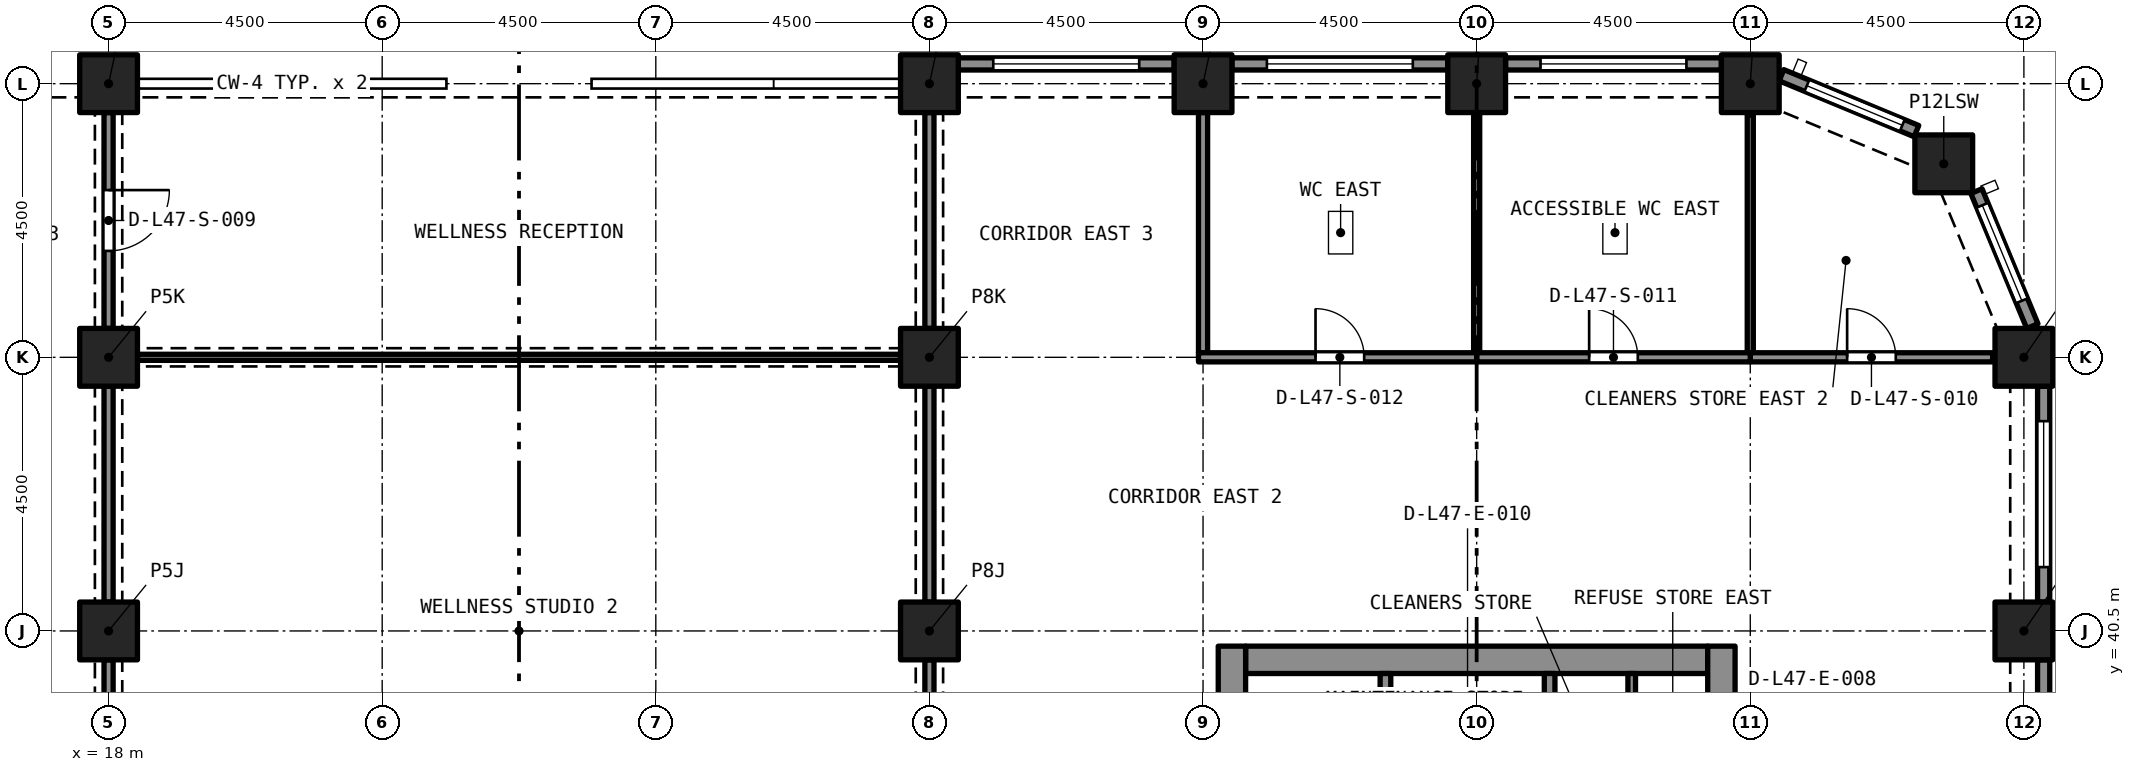
"""IFC4 building model, lengths in metres.
Left out: names, types, materials, properties, quantities, classifications, styles, units other than length and angle.
Written with IfcOpenShell. Run it as: python <this file> out.ifc"""

import sys

from ifc_helpers import new_model, si_unit, direction, frame, frame_2d, origin, origin_2d, place, context, subcontext, project, spatial, rectangle, extrude, element, fill, save


model = new_model("IFC4")
c1 = context("Model", 3, precision=1e-05, world=origin(), true_north=direction((0.0, 1.0)))
c2 = subcontext(c1, "Body", "Model", "MODEL_VIEW")
j1 = project(units=[si_unit("LENGTHUNIT", "METRE"), si_unit("PLANEANGLEUNIT", "RADIAN")], contexts=[c1])
p1 = place(None, origin())
s1 = spatial("IfcSite", under=j1, at=p1, CompositionType="ELEMENT")
p2 = place(p1, origin())
s2 = spatial("IfcBuilding", under=s1, at=p2, CompositionType="ELEMENT")
p3 = place(p2, frame((0.0, 0.0, 172.6)))
s3 = spatial("IfcBuildingStorey", under=s2, at=p3, CompositionType="ELEMENT", Elevation=172.6)
for number, where, z_axis, x_axis in (
    (1, (18.0, 40.5, 0.0), (0.0, 0.0, 1.0), (1.0, 0.0, 0.0)),
    (2, (31.5, 40.5, 0.0), (0.0, 0.0, 1.0), (1.0, 0.0, 0.0)),
    (3, (49.5, 40.5, 0.0), (0.0, 0.0, 1.0), (1.0, 0.0, 0.0)),
    (4, (18.0, 45.0, 0.0), (0.0, 0.0, 1.0), (1.0, 0.0, 0.0)),
    (5, (31.5, 45.0, 0.0), (0.0, 0.0, 1.0), (1.0, 0.0, 0.0)),
    (6, (49.5, 45.0, 0.0), (0.0, 0.0, 1.0), (1.0, 0.0, 0.0)),
    (7, (48.182, 48.182, 0.0), (0.0, 0.0, 1.0), (1.0, 0.0, 0.0)),
    (8, (18.0, 49.5, 0.0), (0.0, 0.0, 1.0), (1.0, 0.0, 0.0)),
    (9, (31.5, 49.5, 0.0), (0.0, 0.0, 1.0), (1.0, 0.0, 0.0)),
    (10, (36.0, 49.5, 0.0), (0.0, 0.0, 1.0), (1.0, 0.0, 0.0)),
    (11, (40.5, 49.5, 0.0), (0.0, 0.0, 1.0), (1.0, 0.0, 0.0)),
    (12, (45.0, 49.5, 0.0), (0.0, 0.0, 1.0), (1.0, 0.0, 0.0)),
):
    element("IfcColumn", number, at=place(p3, frame(where, z_axis=z_axis, x_axis=x_axis)), inside=s3, PredefinedType="COLUMN", context=c2, shape_type="SweptSolid", body=[
        extrude(rectangle(XDim=0.95, YDim=0.95, at=origin_2d()), origin(), (0.0, 0.0, 1.0), 3.7),
    ])
p4 = place(p3, frame((36.7, 40.025, 0.0), z_axis=(0.0, 0.0, 1.0), x_axis=(1.0, 0.0, 0.0)))
e13 = element("IfcWall", 13, at=p4, inside=s3, PredefinedType="SOLIDWALL", context=c2, shape_type="SweptSolid", body=[
    extrude(rectangle(XDim=7.6, YDim=0.45, at=frame_2d((3.8, 0.0))), origin(), (0.0, 0.0, 1.0), 3.7),
])
p5 = place(p3, frame((36.475, 27.25, 0.0), z_axis=(0.0, 0.0, 1.0), x_axis=(0.0, 1.0, 0.0)))
e14 = element("IfcWall", 14, at=p5, inside=s3, PredefinedType="SOLIDWALL", context=c2, shape_type="SweptSolid", body=[
    extrude(rectangle(XDim=13.0, YDim=0.45, at=frame_2d((6.5, 0.0))), origin(), (0.0, 0.0, 1.0), 3.7),
])
p6 = place(p5, frame((8.7, 0.0, 0.0)))
e15 = element("IfcOpeningElement", 15, at=p6, cuts=e14, PredefinedType="OPENING", context=c2, shape_type="SweptSolid", body=[
    extrude(rectangle(XDim=1.2, YDim=2.1, at=frame_2d((0.6, 1.05))), frame((0.0, 0.235, 0.0), z_axis=(0.0, -1.0, 0.0), x_axis=(1.0, 0.0, 0.0)), (0.0, 0.0, 1.0), 0.47),
])
p7 = place(p3, frame((44.525, 27.25, 0.0), z_axis=(0.0, 0.0, 1.0), x_axis=(0.0, 1.0, 0.0)))
e16 = element("IfcWall", 16, at=p7, inside=s3, PredefinedType="SOLIDWALL", context=c2, shape_type="SweptSolid", body=[
    extrude(rectangle(XDim=13.0, YDim=0.45, at=frame_2d((6.5, 0.0))), origin(), (0.0, 0.0, 1.0), 3.7),
])
p8 = place(p7, frame((8.7, 0.0, 0.0)))
e17 = element("IfcOpeningElement", 17, at=p8, cuts=e16, PredefinedType="OPENING", context=c2, shape_type="SweptSolid", body=[
    extrude(rectangle(XDim=1.2, YDim=2.1, at=frame_2d((0.6, 1.05))), frame((0.0, 0.235, 0.0), z_axis=(0.0, -1.0, 0.0), x_axis=(1.0, 0.0, 0.0)), (0.0, 0.0, 1.0), 0.47),
])
p9 = place(p3, frame((49.825, 40.025, 0.0), z_axis=(0.0, 0.0, 1.0), x_axis=(0.0, -1.0, 0.0)))
e18 = element("IfcWall", 18, at=p9, inside=s3, PredefinedType="SOLIDWALL", context=c2, shape_type="SweptSolid", body=[
    extrude(rectangle(XDim=3.55, YDim=0.2, at=frame_2d((1.775, 0.0))), origin(), (0.0, 0.0, 1.0), 3.7),
])
p10 = place(p9, frame((0.575, 0.0, 0.45)))
e19 = element("IfcOpeningElement", 19, at=p10, cuts=e18, PredefinedType="OPENING", context=c2, shape_type="SweptSolid", body=[
    extrude(rectangle(XDim=2.4, YDim=1.95, at=frame_2d((1.2, 0.975))), frame((0.0, 0.11, 0.0), z_axis=(0.0, -1.0, 0.0), x_axis=(1.0, 0.0, 0.0)), (0.0, 0.0, 1.0), 0.22),
])
p11 = place(p3, frame((49.825, 44.525, 0.0), z_axis=(0.0, 0.0, 1.0), x_axis=(0.0, -1.0, 0.0)))
e20 = element("IfcWall", 20, at=p11, inside=s3, PredefinedType="SOLIDWALL", context=c2, shape_type="SweptSolid", body=[
    extrude(rectangle(XDim=3.55, YDim=0.2, at=frame_2d((1.775, 0.0))), origin(), (0.0, 0.0, 1.0), 3.7),
])
p12 = place(p11, frame((0.575, 0.0, 0.45)))
e21 = element("IfcOpeningElement", 21, at=p12, cuts=e20, PredefinedType="OPENING", context=c2, shape_type="SweptSolid", body=[
    extrude(rectangle(XDim=2.4, YDim=1.95, at=frame_2d((1.2, 0.975))), frame((0.0, 0.11, 0.0), z_axis=(0.0, -1.0, 0.0), x_axis=(1.0, 0.0, 0.0)), (0.0, 0.0, 1.0), 0.22),
])
p13 = place(p3, frame((48.72, 47.733, 0.0), z_axis=(0.0, 0.0, 1.0), x_axis=(0.382680855588, -0.923880599843, 0.0)))
e22 = element("IfcWall", 22, at=p13, inside=s3, PredefinedType="SOLIDWALL", context=c2, shape_type="SweptSolid", body=[
    extrude(rectangle(XDim=2.403, YDim=0.2, at=frame_2d((1.201, 0.0))), origin(), (0.0, 0.0, 1.0), 3.7),
])
p14 = place(p13, frame((0.251, 0.0, 0.45)))
e23 = element("IfcOpeningElement", 23, at=p14, cuts=e22, PredefinedType="OPENING", context=c2, shape_type="SweptSolid", body=[
    extrude(rectangle(XDim=1.7, YDim=1.95, at=frame_2d((0.85, 0.975))), frame((0.0, 0.11, 0.0), z_axis=(0.0, -1.0, 0.0), x_axis=(1.0, 0.0, 0.0)), (0.0, 0.0, 1.0), 0.22),
])
p15 = place(p3, frame((45.513, 49.639, 0.0), z_axis=(0.0, 0.0, 1.0), x_axis=(0.923880599843, -0.382680855588, 0.0)))
e24 = element("IfcWall", 24, at=p15, inside=s3, PredefinedType="SOLIDWALL", context=c2, shape_type="SweptSolid", body=[
    extrude(rectangle(XDim=2.403, YDim=0.2, at=frame_2d((1.201, 0.0))), origin(), (0.0, 0.0, 1.0), 3.7),
])
p16 = place(p15, frame((0.451, 0.0, 0.45)))
e25 = element("IfcOpeningElement", 25, at=p16, cuts=e24, PredefinedType="OPENING", context=c2, shape_type="SweptSolid", body=[
    extrude(rectangle(XDim=1.7, YDim=1.95, at=frame_2d((0.85, 0.975))), frame((0.0, 0.11, 0.0), z_axis=(0.0, -1.0, 0.0), x_axis=(1.0, 0.0, 0.0)), (0.0, 0.0, 1.0), 0.22),
])
p17 = place(p3, frame((40.975, 49.825, 0.0), z_axis=(0.0, 0.0, 1.0), x_axis=(1.0, 0.0, 0.0)))
e26 = element("IfcWall", 26, at=p17, inside=s3, PredefinedType="SOLIDWALL", context=c2, shape_type="SweptSolid", body=[
    extrude(rectangle(XDim=3.55, YDim=0.2, at=frame_2d((1.775, 0.0))), origin(), (0.0, 0.0, 1.0), 3.7),
])
p18 = place(p17, frame((0.575, 0.0, 0.45)))
e27 = element("IfcOpeningElement", 27, at=p18, cuts=e26, PredefinedType="OPENING", context=c2, shape_type="SweptSolid", body=[
    extrude(rectangle(XDim=2.4, YDim=1.95, at=frame_2d((1.2, 0.975))), frame((0.0, 0.11, 0.0), z_axis=(0.0, -1.0, 0.0), x_axis=(1.0, 0.0, 0.0)), (0.0, 0.0, 1.0), 0.22),
])
p19 = place(p3, frame((36.475, 49.825, 0.0), z_axis=(0.0, 0.0, 1.0), x_axis=(1.0, 0.0, 0.0)))
e28 = element("IfcWall", 28, at=p19, inside=s3, PredefinedType="SOLIDWALL", context=c2, shape_type="SweptSolid", body=[
    extrude(rectangle(XDim=3.55, YDim=0.2, at=frame_2d((1.775, 0.0))), origin(), (0.0, 0.0, 1.0), 3.7),
])
p20 = place(p19, frame((0.575, 0.0, 0.45)))
e29 = element("IfcOpeningElement", 29, at=p20, cuts=e28, PredefinedType="OPENING", context=c2, shape_type="SweptSolid", body=[
    extrude(rectangle(XDim=2.4, YDim=1.95, at=frame_2d((1.2, 0.975))), frame((0.0, 0.11, 0.0), z_axis=(0.0, -1.0, 0.0), x_axis=(1.0, 0.0, 0.0)), (0.0, 0.0, 1.0), 0.22),
])
p21 = place(p3, frame((31.975, 49.825, 0.0), z_axis=(0.0, 0.0, 1.0), x_axis=(1.0, 0.0, 0.0)))
e30 = element("IfcWall", 30, at=p21, inside=s3, PredefinedType="SOLIDWALL", context=c2, shape_type="SweptSolid", body=[
    extrude(rectangle(XDim=3.55, YDim=0.2, at=frame_2d((1.775, 0.0))), origin(), (0.0, 0.0, 1.0), 3.7),
])
p22 = place(p21, frame((0.575, 0.0, 0.45)))
e31 = element("IfcOpeningElement", 31, at=p22, cuts=e30, PredefinedType="OPENING", context=c2, shape_type="SweptSolid", body=[
    extrude(rectangle(XDim=2.4, YDim=1.95, at=frame_2d((1.2, 0.975))), frame((0.0, 0.11, 0.0), z_axis=(0.0, -1.0, 0.0), x_axis=(1.0, 0.0, 0.0)), (0.0, 0.0, 1.0), 0.22),
])
for number, where, z_axis, x_axis in (
    (32, (41.7, 37.5, 0.0), (0.0, 0.0, 1.0), (0.0, 1.0, 0.0)),
    (33, (39.0, 37.5, 0.0), (0.0, 0.0, 1.0), (0.0, 1.0, 0.0)),
):
    element("IfcWall", number, at=place(p3, frame(where, z_axis=z_axis, x_axis=x_axis)), inside=s3, PredefinedType="SOLIDWALL", context=c2, shape_type="SweptSolid", body=[
        extrude(rectangle(XDim=2.3, YDim=0.175, at=frame_2d((1.15, 0.0))), origin(), (0.0, 0.0, 1.0), 3.4),
    ])
p23 = place(p3, frame((43.05, 37.5, 0.0), z_axis=(0.0, 0.0, 1.0), x_axis=(0.0, 1.0, 0.0)))
e34 = element("IfcWall", 34, at=p23, inside=s3, PredefinedType="PARTITIONING", context=c2, shape_type="SweptSolid", body=[
    extrude(rectangle(XDim=2.3, YDim=0.125, at=frame_2d((1.15, 0.0))), origin(), (0.0, 0.0, 1.0), 3.4),
])
p24 = place(p3, frame((18.475, 45.0, 0.0), z_axis=(0.0, 0.0, 1.0), x_axis=(1.0, 0.0, 0.0)))
e35 = element("IfcWall", 35, at=p24, inside=s3, PredefinedType="PARTITIONING", context=c2, shape_type="SweptSolid", body=[
    extrude(rectangle(XDim=12.55, YDim=0.1, at=frame_2d((6.275, 0.0))), origin(), (0.0, 0.0, 1.0), 3.25),
])
p25 = place(p3, frame((31.5, 36.475, 0.0), z_axis=(0.0, 0.0, 1.0), x_axis=(0.0, 1.0, 0.0)))
e36 = element("IfcWall", 36, at=p25, inside=s3, PredefinedType="PARTITIONING", context=c2, shape_type="SweptSolid", body=[
    extrude(rectangle(XDim=3.55, YDim=0.15, at=frame_2d((1.775, 0.0))), origin(), (0.0, 0.0, 1.0), 2.88),
])
p26 = place(p25, frame((1.275, 0.0, 0.0)))
e37 = element("IfcOpeningElement", 37, at=p26, cuts=e36, PredefinedType="OPENING", context=c2, shape_type="SweptSolid", body=[
    extrude(rectangle(XDim=1.0, YDim=2.1, at=frame_2d((0.5, 1.05))), frame((0.0, 0.085, 0.0), z_axis=(0.0, -1.0, 0.0), x_axis=(1.0, 0.0, 0.0)), (0.0, 0.0, 1.0), 0.17),
])
p27 = place(p3, frame((31.5, 40.975, 0.0), z_axis=(0.0, 0.0, 1.0), x_axis=(0.0, 1.0, 0.0)))
e38 = element("IfcWall", 38, at=p27, inside=s3, PredefinedType="PARTITIONING", context=c2, shape_type="SweptSolid", body=[
    extrude(rectangle(XDim=3.55, YDim=0.15, at=frame_2d((1.775, 0.0))), origin(), (0.0, 0.0, 1.0), 2.88),
])
p28 = place(p3, frame((18.0, 40.025, 0.0), z_axis=(0.0, 0.0, 1.0), x_axis=(0.0, -1.0, 0.0)))
e39 = element("IfcWall", 39, at=p28, inside=s3, PredefinedType="PARTITIONING", context=c2, shape_type="SweptSolid", body=[
    extrude(rectangle(XDim=3.55, YDim=0.15, at=frame_2d((1.775, 0.0))), origin(), (0.0, 0.0, 1.0), 2.88),
])
p29 = place(p28, frame((1.275, 0.0, 0.0)))
e40 = element("IfcOpeningElement", 40, at=p29, cuts=e39, PredefinedType="OPENING", context=c2, shape_type="SweptSolid", body=[
    extrude(rectangle(XDim=1.0, YDim=2.1, at=frame_2d((0.5, 1.05))), frame((0.0, 0.085, 0.0), z_axis=(0.0, -1.0, 0.0), x_axis=(1.0, 0.0, 0.0)), (0.0, 0.0, 1.0), 0.17),
])
for number, where, z_axis, x_axis in (
    (41, (18.0, 40.975, 0.0), (0.0, 0.0, 1.0), (0.0, 1.0, 0.0)),
    (42, (31.5, 45.475, 0.0), (0.0, 0.0, 1.0), (0.0, 1.0, 0.0)),
):
    element("IfcWall", number, at=place(p3, frame(where, z_axis=z_axis, x_axis=x_axis)), inside=s3, PredefinedType="PARTITIONING", context=c2, shape_type="SweptSolid", body=[
        extrude(rectangle(XDim=3.55, YDim=0.15, at=frame_2d((1.775, 0.0))), origin(), (0.0, 0.0, 1.0), 2.88),
    ])
p30 = place(p3, frame((18.0, 49.025, 0.0), z_axis=(0.0, 0.0, 1.0), x_axis=(0.0, -1.0, 0.0)))
e43 = element("IfcWall", 43, at=p30, inside=s3, PredefinedType="PARTITIONING", context=c2, shape_type="SweptSolid", body=[
    extrude(rectangle(XDim=3.55, YDim=0.15, at=frame_2d((1.775, 0.0))), origin(), (0.0, 0.0, 1.0), 2.88),
])
p31 = place(p30, frame((1.275, 0.0, 0.0)))
e44 = element("IfcOpeningElement", 44, at=p31, cuts=e43, PredefinedType="OPENING", context=c2, shape_type="SweptSolid", body=[
    extrude(rectangle(XDim=1.0, YDim=2.1, at=frame_2d((0.5, 1.05))), frame((0.0, 0.085, 0.0), z_axis=(0.0, -1.0, 0.0), x_axis=(1.0, 0.0, 0.0)), (0.0, 0.0, 1.0), 0.17),
])
p32 = place(p3, frame((45.0, 45.075, 0.0), z_axis=(0.0, 0.0, 1.0), x_axis=(0.0, 1.0, 0.0)))
e45 = element("IfcWall", 45, at=p32, inside=s3, PredefinedType="PARTITIONING", context=c2, shape_type="SweptSolid", body=[
    extrude(rectangle(XDim=3.911, YDim=0.1, at=frame_2d((1.956, 0.0))), origin(), (0.0, 0.0, 1.0), 3.4),
])
p33 = place(p3, frame((45.0, 45.0, 0.0), z_axis=(0.0, 0.0, 1.0), x_axis=(1.0, 0.0, 0.0)))
e46 = element("IfcWall", 46, at=p33, inside=s3, PredefinedType="PARTITIONING", context=c2, shape_type="SweptSolid", body=[
    extrude(rectangle(XDim=3.986, YDim=0.15, at=frame_2d((1.993, 0.0))), origin(), (0.0, 0.0, 1.0), 3.4),
])
p34 = place(p33, frame((1.593, 0.0, 0.0)))
e47 = element("IfcOpeningElement", 47, at=p34, cuts=e46, PredefinedType="OPENING", context=c2, shape_type="SweptSolid", body=[
    extrude(rectangle(XDim=0.8, YDim=2.1, at=frame_2d((0.4, 1.05))), frame((0.0, 0.085, 0.0), z_axis=(0.0, -1.0, 0.0), x_axis=(1.0, 0.0, 0.0)), (0.0, 0.0, 1.0), 0.17),
])
p35 = place(p3, frame((40.5, 45.075, 0.0), z_axis=(0.0, 0.0, 1.0), x_axis=(0.0, 1.0, 0.0)))
e48 = element("IfcWall", 48, at=p35, inside=s3, PredefinedType="PARTITIONING", context=c2, shape_type="SweptSolid", body=[
    extrude(rectangle(XDim=3.95, YDim=0.1, at=frame_2d((1.975, 0.0))), origin(), (0.0, 0.0, 1.0), 3.4),
])
p36 = place(p3, frame((40.5, 45.0, 0.0), z_axis=(0.0, 0.0, 1.0), x_axis=(1.0, 0.0, 0.0)))
e49 = element("IfcWall", 49, at=p36, inside=s3, PredefinedType="PARTITIONING", context=c2, shape_type="SweptSolid", body=[
    extrude(rectangle(XDim=4.5, YDim=0.15, at=frame_2d((2.25, 0.0))), origin(), (0.0, 0.0, 1.0), 3.4),
])
p37 = place(p36, frame((1.85, 0.0, 0.0)))
e50 = element("IfcOpeningElement", 50, at=p37, cuts=e49, PredefinedType="OPENING", context=c2, shape_type="SweptSolid", body=[
    extrude(rectangle(XDim=0.8, YDim=2.1, at=frame_2d((0.4, 1.05))), frame((0.0, 0.085, 0.0), z_axis=(0.0, -1.0, 0.0), x_axis=(1.0, 0.0, 0.0)), (0.0, 0.0, 1.0), 0.17),
])
p38 = place(p3, frame((36.0, 45.075, 0.0), z_axis=(0.0, 0.0, 1.0), x_axis=(0.0, 1.0, 0.0)))
e51 = element("IfcWall", 51, at=p38, inside=s3, PredefinedType="PARTITIONING", context=c2, shape_type="SweptSolid", body=[
    extrude(rectangle(XDim=3.95, YDim=0.15, at=frame_2d((1.975, 0.0))), origin(), (0.0, 0.0, 1.0), 3.4),
])
p39 = place(p3, frame((35.925, 45.0, 0.0), z_axis=(0.0, 0.0, 1.0), x_axis=(1.0, 0.0, 0.0)))
e52 = element("IfcWall", 52, at=p39, inside=s3, PredefinedType="PARTITIONING", context=c2, shape_type="SweptSolid", body=[
    extrude(rectangle(XDim=4.575, YDim=0.15, at=frame_2d((2.288, 0.0))), origin(), (0.0, 0.0, 1.0), 3.4),
])
p40 = place(p39, frame((1.925, 0.0, 0.0)))
e53 = element("IfcOpeningElement", 53, at=p40, cuts=e52, PredefinedType="OPENING", context=c2, shape_type="SweptSolid", body=[
    extrude(rectangle(XDim=0.8, YDim=2.1, at=frame_2d((0.4, 1.05))), frame((0.0, 0.085, 0.0), z_axis=(0.0, -1.0, 0.0), x_axis=(1.0, 0.0, 0.0)), (0.0, 0.0, 1.0), 0.17),
])
p41 = place(p12, origin())
e54 = element("IfcWindow", 54, at=p41, inside=s3, PartitioningType="SINGLE_PANEL", PredefinedType="WINDOW", context=c2, shape_type="SweptSolid", body=[
    extrude(rectangle(XDim=2.4, YDim=1.95, at=frame_2d((1.2, 0.975))), frame((0.0, 0.03, 0.0), z_axis=(0.0, -1.0, 0.0), x_axis=(1.0, 0.0, 0.0)), (0.0, 0.0, 1.0), 0.06),
])
fill(e21, e54)
p42 = place(p14, origin())
e55 = element("IfcWindow", 55, at=p42, inside=s3, PartitioningType="SINGLE_PANEL", PredefinedType="WINDOW", context=c2, shape_type="SweptSolid", body=[
    extrude(rectangle(XDim=1.7, YDim=1.95, at=frame_2d((0.85, 0.975))), frame((0.0, 0.03, 0.0), z_axis=(0.0, -1.0, 0.0), x_axis=(1.0, 0.0, 0.0)), (0.0, 0.0, 1.0), 0.06),
])
fill(e23, e55)
p43 = place(p16, origin())
e56 = element("IfcWindow", 56, at=p43, inside=s3, PartitioningType="SINGLE_PANEL", PredefinedType="WINDOW", context=c2, shape_type="SweptSolid", body=[
    extrude(rectangle(XDim=1.7, YDim=1.95, at=frame_2d((0.85, 0.975))), frame((0.0, 0.03, 0.0), z_axis=(0.0, -1.0, 0.0), x_axis=(1.0, 0.0, 0.0)), (0.0, 0.0, 1.0), 0.06),
])
fill(e25, e56)
p44 = place(p18, origin())
e57 = element("IfcWindow", 57, at=p44, inside=s3, PartitioningType="SINGLE_PANEL", PredefinedType="WINDOW", context=c2, shape_type="SweptSolid", body=[
    extrude(rectangle(XDim=2.4, YDim=1.95, at=frame_2d((1.2, 0.975))), frame((0.0, 0.03, 0.0), z_axis=(0.0, -1.0, 0.0), x_axis=(1.0, 0.0, 0.0)), (0.0, 0.0, 1.0), 0.06),
])
fill(e27, e57)
p45 = place(p20, origin())
e58 = element("IfcWindow", 58, at=p45, inside=s3, PartitioningType="SINGLE_PANEL", PredefinedType="WINDOW", context=c2, shape_type="SweptSolid", body=[
    extrude(rectangle(XDim=2.4, YDim=1.95, at=frame_2d((1.2, 0.975))), frame((0.0, 0.03, 0.0), z_axis=(0.0, -1.0, 0.0), x_axis=(1.0, 0.0, 0.0)), (0.0, 0.0, 1.0), 0.06),
])
fill(e29, e58)
p46 = place(p22, origin())
e59 = element("IfcWindow", 59, at=p46, inside=s3, PartitioningType="SINGLE_PANEL", PredefinedType="WINDOW", context=c2, shape_type="SweptSolid", body=[
    extrude(rectangle(XDim=2.4, YDim=1.95, at=frame_2d((1.2, 0.975))), frame((0.0, 0.03, 0.0), z_axis=(0.0, -1.0, 0.0), x_axis=(1.0, 0.0, 0.0)), (0.0, 0.0, 1.0), 0.06),
])
fill(e31, e59)
p47 = place(p31, origin())
e60 = element("IfcDoor", 60, at=p47, inside=s3, OperationType="SINGLE_SWING_RIGHT", PredefinedType="DOOR", context=c2, shape_type="SweptSolid", body=[
    extrude(rectangle(XDim=1.0, YDim=2.1, at=frame_2d((0.5, 1.05))), frame((0.0, 0.025, 0.0), z_axis=(0.0, -1.0, 0.0), x_axis=(1.0, 0.0, 0.0)), (0.0, 0.0, 1.0), 0.05),
])
fill(e44, e60)
p48 = place(p34, origin())
e61 = element("IfcDoor", 61, at=p48, inside=s3, OperationType="SINGLE_SWING_RIGHT", PredefinedType="DOOR", context=c2, shape_type="SweptSolid", body=[
    extrude(rectangle(XDim=0.8, YDim=2.1, at=frame_2d((0.4, 1.05))), frame((0.0, 0.025, 0.0), z_axis=(0.0, -1.0, 0.0), x_axis=(1.0, 0.0, 0.0)), (0.0, 0.0, 1.0), 0.05),
])
fill(e47, e61)
p49 = place(p37, origin())
e62 = element("IfcDoor", 62, at=p49, inside=s3, OperationType="SINGLE_SWING_RIGHT", PredefinedType="DOOR", context=c2, shape_type="SweptSolid", body=[
    extrude(rectangle(XDim=0.8, YDim=2.1, at=frame_2d((0.4, 1.05))), frame((0.0, 0.025, 0.0), z_axis=(0.0, -1.0, 0.0), x_axis=(1.0, 0.0, 0.0)), (0.0, 0.0, 1.0), 0.05),
])
fill(e50, e62)
p50 = place(p40, origin())
e63 = element("IfcDoor", 63, at=p50, inside=s3, OperationType="SINGLE_SWING_RIGHT", PredefinedType="DOOR", context=c2, shape_type="SweptSolid", body=[
    extrude(rectangle(XDim=0.8, YDim=2.1, at=frame_2d((0.4, 1.05))), frame((0.0, 0.025, 0.0), z_axis=(0.0, -1.0, 0.0), x_axis=(1.0, 0.0, 0.0)), (0.0, 0.0, 1.0), 0.05),
])
fill(e53, e63)
save(model, sys.argv[1])
